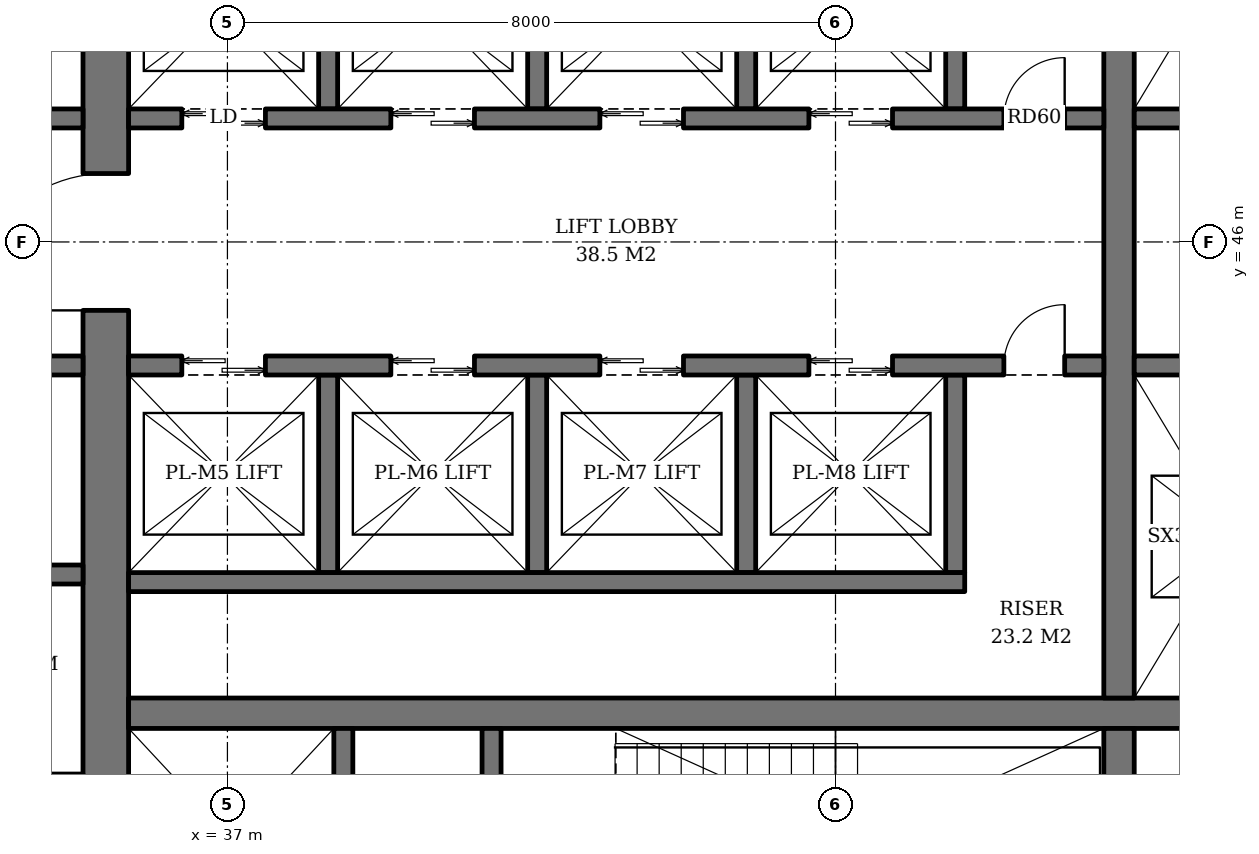
"""IFC4 building model, lengths in metres.
Left out: names, types, materials, properties, quantities, classifications, styles, units other than length and angle.
Written with IfcOpenShell. Run it as: python <this file> out.ifc"""

import sys

from ifc_helpers import new_model, si_unit, direction, frame, frame_2d, origin, place, context, subcontext, project, spatial, rectangle, extrude, element, fill, save


model = new_model("IFC4")
c1 = context("Model", 3, precision=1e-05, world=origin(), true_north=direction((0.0, 1.0)))
c2 = subcontext(c1, "Body", "Model", "MODEL_VIEW")
j1 = project(units=[si_unit("LENGTHUNIT", "METRE"), si_unit("PLANEANGLEUNIT", "RADIAN")], contexts=[c1])
p1 = place(None, origin())
s1 = spatial("IfcSite", under=j1, at=p1, CompositionType="ELEMENT")
p2 = place(p1, origin())
s2 = spatial("IfcBuilding", under=s1, at=p2, CompositionType="ELEMENT")
p3 = place(p2, frame((0.0, 0.0, 119.8)))
s3 = spatial("IfcBuildingStorey", under=s2, at=p3, CompositionType="ELEMENT", Elevation=119.8)
p4 = place(p3, frame((35.4, 36.7, 0.0), z_axis=(0.0, 0.0, 1.0), x_axis=(0.0, 1.0, 0.0)))
e1 = element("IfcWall", 1, at=p4, inside=s3, PredefinedType="SHEAR", context=c2, shape_type="SweptSolid", body=[
    extrude(rectangle(XDim=18.6, YDim=0.6, at=frame_2d((9.3, 0.0))), origin(), (0.0, 0.0, 1.0), 3.8),
])
p5 = place(p4, frame((8.4, 0.0, 0.0)))
e2 = element("IfcOpeningElement", 2, at=p5, cuts=e1, PredefinedType="OPENING", context=c2, shape_type="SweptSolid", body=[
    extrude(rectangle(XDim=1.8, YDim=2.4, at=frame_2d((0.9, 1.2))), frame((0.0, 0.31, 0.0), z_axis=(0.0, -1.0, 0.0), x_axis=(1.0, 0.0, 0.0)), (0.0, 0.0, 1.0), 0.62),
])
p6 = place(p3, frame((35.7, 39.8, 0.0), z_axis=(0.0, 0.0, 1.0), x_axis=(1.0, 0.0, 0.0)))
e3 = element("IfcWall", 3, at=p6, inside=s3, PredefinedType="SHEAR", context=c2, shape_type="SweptSolid", body=[
    extrude(rectangle(XDim=18.6, YDim=0.4, at=frame_2d((9.3, 0.0))), origin(), (0.0, 0.0, 1.0), 3.8),
])
p7 = place(p3, frame((48.73, 36.7, 0.0), z_axis=(0.0, 0.0, 1.0), x_axis=(0.0, 1.0, 0.0)))
e4 = element("IfcWall", 4, at=p7, inside=s3, PredefinedType="SHEAR", context=c2, shape_type="SweptSolid", body=[
    extrude(rectangle(XDim=2.9, YDim=0.4, at=frame_2d((1.45, 0.0))), origin(), (0.0, 0.0, 1.0), 3.8),
])
p8 = place(p3, frame((48.73, 40.0, 0.0), z_axis=(0.0, 0.0, 1.0), x_axis=(0.0, 1.0, 0.0)))
e5 = element("IfcWall", 5, at=p8, inside=s3, PredefinedType="SHEAR", context=c2, shape_type="SweptSolid", body=[
    extrude(rectangle(XDim=12.0, YDim=0.4, at=frame_2d((6.0, 0.0))), origin(), (0.0, 0.0, 1.0), 3.8),
])
p9 = place(p3, frame((38.525, 36.7, 0.0), z_axis=(0.0, 0.0, 1.0), x_axis=(0.0, 1.0, 0.0)))
e6 = element("IfcWall", 6, at=p9, inside=s3, PredefinedType="SHEAR", context=c2, shape_type="SweptSolid", body=[
    extrude(rectangle(XDim=2.9, YDim=0.25, at=frame_2d((1.45, 0.0))), origin(), (0.0, 0.0, 1.0), 3.8),
])
p10 = place(p9, frame((0.8, 0.0, 0.0)))
e7 = element("IfcOpeningElement", 7, at=p10, cuts=e6, PredefinedType="OPENING", context=c2, shape_type="SweptSolid", body=[
    extrude(rectangle(XDim=1.3, YDim=2.2, at=frame_2d((0.65, 1.1))), frame((0.0, 0.135, 0.0), z_axis=(0.0, -1.0, 0.0), x_axis=(1.0, 0.0, 0.0)), (0.0, 0.0, 1.0), 0.27),
])
p11 = place(p3, frame((40.475, 36.7, 0.0), z_axis=(0.0, 0.0, 1.0), x_axis=(0.0, 1.0, 0.0)))
e8 = element("IfcWall", 8, at=p11, inside=s3, PredefinedType="SHEAR", context=c2, shape_type="SweptSolid", body=[
    extrude(rectangle(XDim=2.9, YDim=0.25, at=frame_2d((1.45, 0.0))), origin(), (0.0, 0.0, 1.0), 3.8),
])
p12 = place(p11, frame((0.75, 0.0, 0.0)))
e9 = element("IfcOpeningElement", 9, at=p12, cuts=e8, PredefinedType="OPENING", context=c2, shape_type="SweptSolid", body=[
    extrude(rectangle(XDim=1.2, YDim=2.1, at=frame_2d((0.6, 1.05))), frame((0.0, 0.135, 0.0), z_axis=(0.0, -1.0, 0.0), x_axis=(1.0, 0.0, 0.0)), (0.0, 0.0, 1.0), 0.27),
])
for number, where, z_axis, x_axis in (
    (10, (38.325, 47.75, 0.0), (0.0, 0.0, 1.0), (0.0, 1.0, 0.0)),
    (11, (41.075, 47.75, 0.0), (0.0, 0.0, 1.0), (0.0, 1.0, 0.0)),
    (12, (43.825, 47.75, 0.0), (0.0, 0.0, 1.0), (0.0, 1.0, 0.0)),
    (13, (46.575, 47.75, 0.0), (0.0, 0.0, 1.0), (0.0, 1.0, 0.0)),
):
    element("IfcWall", number, at=place(p3, frame(where, z_axis=z_axis, x_axis=x_axis)), inside=s3, PredefinedType="SHEAR", context=c2, shape_type="SweptSolid", body=[
        extrude(rectangle(XDim=2.6, YDim=0.25, at=frame_2d((1.3, 0.0))), origin(), (0.0, 0.0, 1.0), 3.8),
    ])
p13 = place(p3, frame((35.7, 47.625, 0.0), z_axis=(0.0, 0.0, 1.0), x_axis=(1.0, 0.0, 0.0)))
e14 = element("IfcWall", 14, at=p13, inside=s3, PredefinedType="SHEAR", context=c2, shape_type="SweptSolid", body=[
    extrude(rectangle(XDim=12.83, YDim=0.25, at=frame_2d((6.415, 0.0))), origin(), (0.0, 0.0, 1.0), 3.8),
])
p14 = place(p13, frame((0.7, 0.0, 0.0)))
e15 = element("IfcOpeningElement", 15, at=p14, cuts=e14, PredefinedType="OPENING", context=c2, shape_type="SweptSolid", body=[
    extrude(rectangle(XDim=1.1, YDim=2.2, at=frame_2d((0.55, 1.1))), frame((0.0, 0.135, 0.0), z_axis=(0.0, -1.0, 0.0), x_axis=(1.0, 0.0, 0.0)), (0.0, 0.0, 1.0), 0.27),
])
p15 = place(p13, frame((3.45, 0.0, 0.0)))
e16 = element("IfcOpeningElement", 16, at=p15, cuts=e14, PredefinedType="OPENING", context=c2, shape_type="SweptSolid", body=[
    extrude(rectangle(XDim=1.1, YDim=2.2, at=frame_2d((0.55, 1.1))), frame((0.0, 0.135, 0.0), z_axis=(0.0, -1.0, 0.0), x_axis=(1.0, 0.0, 0.0)), (0.0, 0.0, 1.0), 0.27),
])
p16 = place(p13, frame((6.2, 0.0, 0.0)))
e17 = element("IfcOpeningElement", 17, at=p16, cuts=e14, PredefinedType="OPENING", context=c2, shape_type="SweptSolid", body=[
    extrude(rectangle(XDim=1.1, YDim=2.2, at=frame_2d((0.55, 1.1))), frame((0.0, 0.135, 0.0), z_axis=(0.0, -1.0, 0.0), x_axis=(1.0, 0.0, 0.0)), (0.0, 0.0, 1.0), 0.27),
])
p17 = place(p13, frame((8.95, 0.0, 0.0)))
e18 = element("IfcOpeningElement", 18, at=p17, cuts=e14, PredefinedType="OPENING", context=c2, shape_type="SweptSolid", body=[
    extrude(rectangle(XDim=1.1, YDim=2.2, at=frame_2d((0.55, 1.1))), frame((0.0, 0.135, 0.0), z_axis=(0.0, -1.0, 0.0), x_axis=(1.0, 0.0, 0.0)), (0.0, 0.0, 1.0), 0.27),
])
p18 = place(p13, frame((11.515, 0.0, 0.0)))
e19 = element("IfcOpeningElement", 19, at=p18, cuts=e14, PredefinedType="OPENING", context=c2, shape_type="SweptSolid", body=[
    extrude(rectangle(XDim=0.8, YDim=2.0, at=frame_2d((0.4, 1.0))), frame((0.0, 0.135, 0.0), z_axis=(0.0, -1.0, 0.0), x_axis=(1.0, 0.0, 0.0)), (0.0, 0.0, 1.0), 0.27),
])
for number, where, z_axis, x_axis in (
    (20, (38.325, 44.25, 0.0), (0.0, 0.0, 1.0), (0.0, -1.0, 0.0)),
    (21, (41.075, 44.25, 0.0), (0.0, 0.0, 1.0), (0.0, -1.0, 0.0)),
    (22, (43.825, 44.25, 0.0), (0.0, 0.0, 1.0), (0.0, -1.0, 0.0)),
    (23, (46.575, 44.25, 0.0), (0.0, 0.0, 1.0), (0.0, -1.0, 0.0)),
):
    element("IfcWall", number, at=place(p3, frame(where, z_axis=z_axis, x_axis=x_axis)), inside=s3, PredefinedType="SHEAR", context=c2, shape_type="SweptSolid", body=[
        extrude(rectangle(XDim=2.6, YDim=0.25, at=frame_2d((1.3, 0.0))), origin(), (0.0, 0.0, 1.0), 3.8),
    ])
p19 = place(p3, frame((35.7, 41.525, 0.0), z_axis=(0.0, 0.0, 1.0), x_axis=(1.0, 0.0, 0.0)))
e24 = element("IfcWall", 24, at=p19, inside=s3, PredefinedType="SHEAR", context=c2, shape_type="SweptSolid", body=[
    extrude(rectangle(XDim=11.0, YDim=0.25, at=frame_2d((5.5, 0.0))), origin(), (0.0, 0.0, 1.0), 3.8),
])
p20 = place(p3, frame((35.7, 44.375, 0.0), z_axis=(0.0, 0.0, 1.0), x_axis=(1.0, 0.0, 0.0)))
e25 = element("IfcWall", 25, at=p20, inside=s3, PredefinedType="SHEAR", context=c2, shape_type="SweptSolid", body=[
    extrude(rectangle(XDim=12.83, YDim=0.25, at=frame_2d((6.415, 0.0))), origin(), (0.0, 0.0, 1.0), 3.8),
])
p21 = place(p20, frame((0.7, 0.0, 0.0)))
e26 = element("IfcOpeningElement", 26, at=p21, cuts=e25, PredefinedType="OPENING", context=c2, shape_type="SweptSolid", body=[
    extrude(rectangle(XDim=1.1, YDim=2.2, at=frame_2d((0.55, 1.1))), frame((0.0, 0.135, 0.0), z_axis=(0.0, -1.0, 0.0), x_axis=(1.0, 0.0, 0.0)), (0.0, 0.0, 1.0), 0.27),
])
p22 = place(p20, frame((3.45, 0.0, 0.0)))
e27 = element("IfcOpeningElement", 27, at=p22, cuts=e25, PredefinedType="OPENING", context=c2, shape_type="SweptSolid", body=[
    extrude(rectangle(XDim=1.1, YDim=2.2, at=frame_2d((0.55, 1.1))), frame((0.0, 0.135, 0.0), z_axis=(0.0, -1.0, 0.0), x_axis=(1.0, 0.0, 0.0)), (0.0, 0.0, 1.0), 0.27),
])
p23 = place(p20, frame((6.2, 0.0, 0.0)))
e28 = element("IfcOpeningElement", 28, at=p23, cuts=e25, PredefinedType="OPENING", context=c2, shape_type="SweptSolid", body=[
    extrude(rectangle(XDim=1.1, YDim=2.2, at=frame_2d((0.55, 1.1))), frame((0.0, 0.135, 0.0), z_axis=(0.0, -1.0, 0.0), x_axis=(1.0, 0.0, 0.0)), (0.0, 0.0, 1.0), 0.27),
])
p24 = place(p20, frame((8.95, 0.0, 0.0)))
e29 = element("IfcOpeningElement", 29, at=p24, cuts=e25, PredefinedType="OPENING", context=c2, shape_type="SweptSolid", body=[
    extrude(rectangle(XDim=1.1, YDim=2.2, at=frame_2d((0.55, 1.1))), frame((0.0, 0.135, 0.0), z_axis=(0.0, -1.0, 0.0), x_axis=(1.0, 0.0, 0.0)), (0.0, 0.0, 1.0), 0.27),
])
p25 = place(p20, frame((11.515, 0.0, 0.0)))
e30 = element("IfcOpeningElement", 30, at=p25, cuts=e25, PredefinedType="OPENING", context=c2, shape_type="SweptSolid", body=[
    extrude(rectangle(XDim=0.8, YDim=2.0, at=frame_2d((0.4, 1.0))), frame((0.0, 0.135, 0.0), z_axis=(0.0, -1.0, 0.0), x_axis=(1.0, 0.0, 0.0)), (0.0, 0.0, 1.0), 0.27),
])
for number, where, z_axis, x_axis in (
    (31, (48.93, 47.625, 0.0), (0.0, 0.0, 1.0), (1.0, 0.0, 0.0)),
    (32, (48.93, 44.375, 0.0), (0.0, 0.0, 1.0), (1.0, 0.0, 0.0)),
):
    element("IfcWall", number, at=place(p3, frame(where, z_axis=z_axis, x_axis=x_axis)), inside=s3, PredefinedType="SHEAR", context=c2, shape_type="SweptSolid", body=[
        extrude(rectangle(XDim=5.37, YDim=0.25, at=frame_2d((2.685, 0.0))), origin(), (0.0, 0.0, 1.0), 3.8),
    ])
for number, where, z_axis, x_axis in (
    (33, (32.4, 41.625, 0.0), (0.0, 0.0, 1.0), (1.0, 0.0, 0.0)),
    (34, (32.4, 44.375, 0.0), (0.0, 0.0, 1.0), (1.0, 0.0, 0.0)),
    (35, (32.4, 47.625, 0.0), (0.0, 0.0, 1.0), (1.0, 0.0, 0.0)),
):
    element("IfcWall", number, at=place(p3, frame(where, z_axis=z_axis, x_axis=x_axis)), inside=s3, PredefinedType="SHEAR", context=c2, shape_type="SweptSolid", body=[
        extrude(rectangle(XDim=2.7, YDim=0.25, at=frame_2d((1.35, 0.0))), origin(), (0.0, 0.0, 1.0), 3.8),
    ])
p26 = place(p14, origin())
e36 = element("IfcDoor", 36, at=p26, inside=s3, OperationType="DOUBLE_DOOR_SLIDING", PredefinedType="DOOR", context=c2, shape_type="SweptSolid", body=[
    extrude(rectangle(XDim=1.1, YDim=2.2, at=frame_2d((0.55, 1.1))), frame((0.0, 0.025, 0.0), z_axis=(0.0, -1.0, 0.0), x_axis=(1.0, 0.0, 0.0)), (0.0, 0.0, 1.0), 0.05),
])
fill(e15, e36)
p27 = place(p15, origin())
e37 = element("IfcDoor", 37, at=p27, inside=s3, OperationType="DOUBLE_DOOR_SLIDING", PredefinedType="DOOR", context=c2, shape_type="SweptSolid", body=[
    extrude(rectangle(XDim=1.1, YDim=2.2, at=frame_2d((0.55, 1.1))), frame((0.0, 0.025, 0.0), z_axis=(0.0, -1.0, 0.0), x_axis=(1.0, 0.0, 0.0)), (0.0, 0.0, 1.0), 0.05),
])
fill(e16, e37)
p28 = place(p16, origin())
e38 = element("IfcDoor", 38, at=p28, inside=s3, OperationType="DOUBLE_DOOR_SLIDING", PredefinedType="DOOR", context=c2, shape_type="SweptSolid", body=[
    extrude(rectangle(XDim=1.1, YDim=2.2, at=frame_2d((0.55, 1.1))), frame((0.0, 0.025, 0.0), z_axis=(0.0, -1.0, 0.0), x_axis=(1.0, 0.0, 0.0)), (0.0, 0.0, 1.0), 0.05),
])
fill(e17, e38)
p29 = place(p17, origin())
e39 = element("IfcDoor", 39, at=p29, inside=s3, OperationType="DOUBLE_DOOR_SLIDING", PredefinedType="DOOR", context=c2, shape_type="SweptSolid", body=[
    extrude(rectangle(XDim=1.1, YDim=2.2, at=frame_2d((0.55, 1.1))), frame((0.0, 0.025, 0.0), z_axis=(0.0, -1.0, 0.0), x_axis=(1.0, 0.0, 0.0)), (0.0, 0.0, 1.0), 0.05),
])
fill(e18, e39)
p30 = place(p18, origin())
e40 = element("IfcDoor", 40, at=p30, inside=s3, OperationType="SINGLE_SWING_RIGHT", PredefinedType="DOOR", context=c2, shape_type="SweptSolid", body=[
    extrude(rectangle(XDim=0.8, YDim=2.0, at=frame_2d((0.4, 1.0))), frame((0.0, 0.025, 0.0), z_axis=(0.0, -1.0, 0.0), x_axis=(1.0, 0.0, 0.0)), (0.0, 0.0, 1.0), 0.05),
])
fill(e19, e40)
p31 = place(p21, origin())
e41 = element("IfcDoor", 41, at=p31, inside=s3, OperationType="DOUBLE_DOOR_SLIDING", PredefinedType="DOOR", context=c2, shape_type="SweptSolid", body=[
    extrude(rectangle(XDim=1.1, YDim=2.2, at=frame_2d((0.55, 1.1))), frame((0.0, 0.025, 0.0), z_axis=(0.0, -1.0, 0.0), x_axis=(1.0, 0.0, 0.0)), (0.0, 0.0, 1.0), 0.05),
])
fill(e26, e41)
p32 = place(p22, origin())
e42 = element("IfcDoor", 42, at=p32, inside=s3, OperationType="DOUBLE_DOOR_SLIDING", PredefinedType="DOOR", context=c2, shape_type="SweptSolid", body=[
    extrude(rectangle(XDim=1.1, YDim=2.2, at=frame_2d((0.55, 1.1))), frame((0.0, 0.025, 0.0), z_axis=(0.0, -1.0, 0.0), x_axis=(1.0, 0.0, 0.0)), (0.0, 0.0, 1.0), 0.05),
])
fill(e27, e42)
p33 = place(p23, origin())
e43 = element("IfcDoor", 43, at=p33, inside=s3, OperationType="DOUBLE_DOOR_SLIDING", PredefinedType="DOOR", context=c2, shape_type="SweptSolid", body=[
    extrude(rectangle(XDim=1.1, YDim=2.2, at=frame_2d((0.55, 1.1))), frame((0.0, 0.025, 0.0), z_axis=(0.0, -1.0, 0.0), x_axis=(1.0, 0.0, 0.0)), (0.0, 0.0, 1.0), 0.05),
])
fill(e28, e43)
p34 = place(p24, origin())
e44 = element("IfcDoor", 44, at=p34, inside=s3, OperationType="DOUBLE_DOOR_SLIDING", PredefinedType="DOOR", context=c2, shape_type="SweptSolid", body=[
    extrude(rectangle(XDim=1.1, YDim=2.2, at=frame_2d((0.55, 1.1))), frame((0.0, 0.025, 0.0), z_axis=(0.0, -1.0, 0.0), x_axis=(1.0, 0.0, 0.0)), (0.0, 0.0, 1.0), 0.05),
])
fill(e29, e44)
p35 = place(p25, origin())
e45 = element("IfcDoor", 45, at=p35, inside=s3, OperationType="SINGLE_SWING_RIGHT", PredefinedType="DOOR", context=c2, shape_type="SweptSolid", body=[
    extrude(rectangle(XDim=0.8, YDim=2.0, at=frame_2d((0.4, 1.0))), frame((0.0, 0.025, 0.0), z_axis=(0.0, -1.0, 0.0), x_axis=(1.0, 0.0, 0.0)), (0.0, 0.0, 1.0), 0.05),
])
fill(e30, e45)
p36 = place(p5, origin())
e46 = element("IfcDoor", 46, at=p36, inside=s3, OperationType="DOUBLE_DOOR_SINGLE_SWING", PredefinedType="DOOR", context=c2, shape_type="SweptSolid", body=[
    extrude(rectangle(XDim=1.8, YDim=2.4, at=frame_2d((0.9, 1.2))), frame((0.0, 0.025, 0.0), z_axis=(0.0, -1.0, 0.0), x_axis=(1.0, 0.0, 0.0)), (0.0, 0.0, 1.0), 0.05),
])
fill(e2, e46)
save(model, sys.argv[1])
